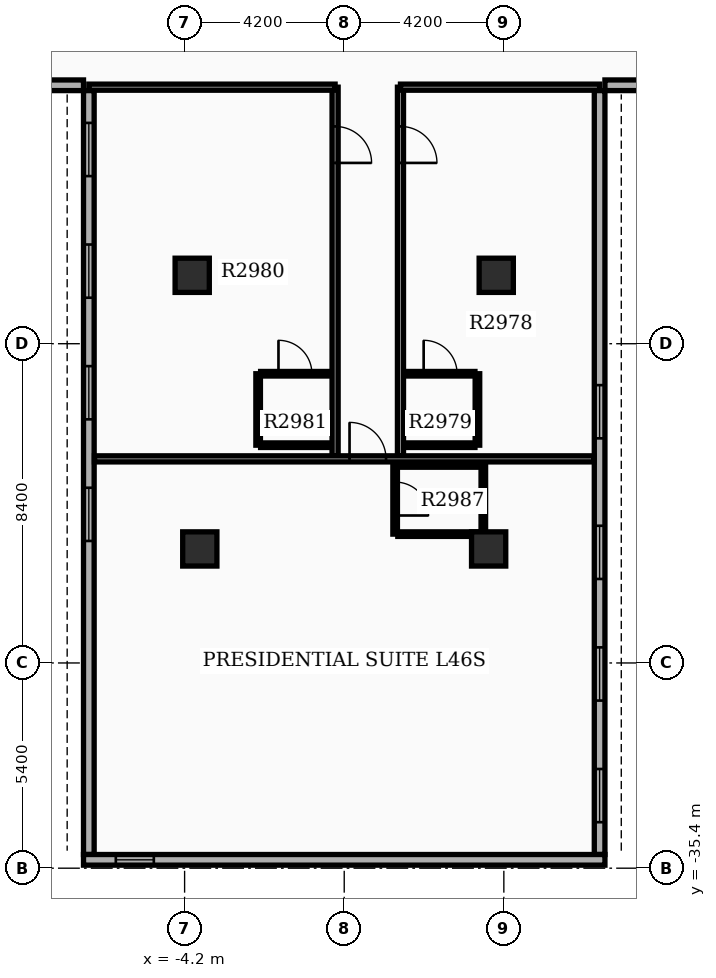
"""IFC4 building model, lengths in metres.
Left out: names, types, materials, properties, quantities, classifications, styles, units other than length and angle.
Written with IfcOpenShell. Run it as: python <this file> out.ifc"""

import sys

from ifc_helpers import new_model, si_unit, direction, frame, frame_2d, origin, origin_2d, place, context, subcontext, project, spatial, rectangle, extrude, element, fill, save


model = new_model("IFC4")
c1 = context("Model", 3, precision=1e-05, world=origin(), true_north=direction((0.0, 1.0)))
c2 = subcontext(c1, "Body", "Model", "MODEL_VIEW")
j1 = project(units=[si_unit("LENGTHUNIT", "METRE"), si_unit("PLANEANGLEUNIT", "RADIAN")], contexts=[c1])
p1 = place(None, origin())
s1 = spatial("IfcSite", under=j1, at=p1, CompositionType="ELEMENT")
p2 = place(p1, origin())
s2 = spatial("IfcBuilding", under=s1, at=p2, CompositionType="ELEMENT")
p3 = place(p2, frame((0.0, 0.0, 183.9)))
s3 = spatial("IfcBuildingStorey", under=s2, at=p3, CompositionType="ELEMENT", Elevation=183.9)
for number, where, z_axis, x_axis in (
    (1, (-4.0, -19.8, 0.0), (0.0, 0.0, 1.0), (1.0, 0.0, 0.0)),
    (2, (4.0, -19.8, 0.0), (0.0, 0.0, 1.0), (1.0, 0.0, 0.0)),
    (3, (-3.8, -27.0, 0.0), (0.0, 0.0, 1.0), (1.0, 0.0, 0.0)),
    (4, (3.8, -27.0, 0.0), (0.0, 0.0, 1.0), (1.0, 0.0, 0.0)),
):
    element("IfcColumn", number, at=place(p3, frame(where, z_axis=z_axis, x_axis=x_axis)), inside=s3, PredefinedType="COLUMN", context=c2, shape_type="SweptSolid", body=[
        extrude(rectangle(XDim=0.9, YDim=0.9, at=origin_2d()), origin(), (0.0, 0.0, 1.0), 3.9),
    ])
p4 = place(p3, frame((-6.72, -14.94, 0.0), z_axis=(0.0, 0.0, 1.0), x_axis=(0.0, -1.0, 0.0)))
e5 = element("IfcWall", 5, at=p4, inside=s3, PredefinedType="STANDARD", context=c2, shape_type="SweptSolid", body=[
    extrude(rectangle(XDim=20.1, YDim=0.28, at=frame_2d((10.05, 0.0))), origin(), (0.0, 0.0, 1.0), 2.97),
])
p5 = place(p4, frame((0.85, 0.0, 0.8)))
e6 = element("IfcOpeningElement", 6, at=p5, cuts=e5, PredefinedType="OPENING", context=c2, shape_type="SweptSolid", body=[
    extrude(rectangle(XDim=1.4, YDim=1.6, at=frame_2d((0.7, 0.8))), frame((0.0, 0.15, 0.0), z_axis=(0.0, -1.0, 0.0), x_axis=(1.0, 0.0, 0.0)), (0.0, 0.0, 1.0), 0.3),
])
p6 = place(p4, frame((4.05, 0.0, 0.8)))
e7 = element("IfcOpeningElement", 7, at=p6, cuts=e5, PredefinedType="OPENING", context=c2, shape_type="SweptSolid", body=[
    extrude(rectangle(XDim=1.4, YDim=1.6, at=frame_2d((0.7, 0.8))), frame((0.0, 0.15, 0.0), z_axis=(0.0, -1.0, 0.0), x_axis=(1.0, 0.0, 0.0)), (0.0, 0.0, 1.0), 0.3),
])
p7 = place(p4, frame((7.25, 0.0, 0.8)))
e8 = element("IfcOpeningElement", 8, at=p7, cuts=e5, PredefinedType="OPENING", context=c2, shape_type="SweptSolid", body=[
    extrude(rectangle(XDim=1.4, YDim=1.6, at=frame_2d((0.7, 0.8))), frame((0.0, 0.15, 0.0), z_axis=(0.0, -1.0, 0.0), x_axis=(1.0, 0.0, 0.0)), (0.0, 0.0, 1.0), 0.3),
])
p8 = place(p4, frame((10.45, 0.0, 0.8)))
e9 = element("IfcOpeningElement", 9, at=p8, cuts=e5, PredefinedType="OPENING", context=c2, shape_type="SweptSolid", body=[
    extrude(rectangle(XDim=1.4, YDim=1.6, at=frame_2d((0.7, 0.8))), frame((0.0, 0.15, 0.0), z_axis=(0.0, -1.0, 0.0), x_axis=(1.0, 0.0, 0.0)), (0.0, 0.0, 1.0), 0.3),
])
p9 = place(p3, frame((6.72, -35.04, 0.0), z_axis=(0.0, 0.0, 1.0), x_axis=(0.0, 1.0, 0.0)))
e10 = element("IfcWall", 10, at=p9, inside=s3, PredefinedType="STANDARD", context=c2, shape_type="SweptSolid", body=[
    extrude(rectangle(XDim=20.1, YDim=0.28, at=frame_2d((10.05, 0.0))), origin(), (0.0, 0.0, 1.0), 2.97),
])
p10 = place(p9, frame((0.85, 0.0, 0.8)))
e11 = element("IfcOpeningElement", 11, at=p10, cuts=e10, PredefinedType="OPENING", context=c2, shape_type="SweptSolid", body=[
    extrude(rectangle(XDim=1.4, YDim=1.6, at=frame_2d((0.7, 0.8))), frame((0.0, 0.15, 0.0), z_axis=(0.0, -1.0, 0.0), x_axis=(1.0, 0.0, 0.0)), (0.0, 0.0, 1.0), 0.3),
])
p11 = place(p9, frame((4.05, 0.0, 0.8)))
e12 = element("IfcOpeningElement", 12, at=p11, cuts=e10, PredefinedType="OPENING", context=c2, shape_type="SweptSolid", body=[
    extrude(rectangle(XDim=1.4, YDim=1.6, at=frame_2d((0.7, 0.8))), frame((0.0, 0.15, 0.0), z_axis=(0.0, -1.0, 0.0), x_axis=(1.0, 0.0, 0.0)), (0.0, 0.0, 1.0), 0.3),
])
p12 = place(p9, frame((7.25, 0.0, 0.8)))
e13 = element("IfcOpeningElement", 13, at=p12, cuts=e10, PredefinedType="OPENING", context=c2, shape_type="SweptSolid", body=[
    extrude(rectangle(XDim=1.4, YDim=1.6, at=frame_2d((0.7, 0.8))), frame((0.0, 0.15, 0.0), z_axis=(0.0, -1.0, 0.0), x_axis=(1.0, 0.0, 0.0)), (0.0, 0.0, 1.0), 0.3),
])
p13 = place(p9, frame((10.95, 0.0, 0.8)))
e14 = element("IfcOpeningElement", 14, at=p13, cuts=e10, PredefinedType="OPENING", context=c2, shape_type="SweptSolid", body=[
    extrude(rectangle(XDim=1.4, YDim=1.6, at=frame_2d((0.7, 0.8))), frame((0.0, 0.15, 0.0), z_axis=(0.0, -1.0, 0.0), x_axis=(1.0, 0.0, 0.0)), (0.0, 0.0, 1.0), 0.3),
])
p14 = place(p3, frame((-6.86, -35.18, 0.0), z_axis=(0.0, 0.0, 1.0), x_axis=(1.0, 0.0, 0.0)))
e15 = element("IfcWall", 15, at=p14, inside=s3, PredefinedType="STANDARD", context=c2, shape_type="SweptSolid", body=[
    extrude(rectangle(XDim=13.72, YDim=0.28, at=frame_2d((6.86, 0.0))), origin(), (0.0, 0.0, 1.0), 2.97),
])
p15 = place(p14, frame((0.85, 0.0, 0.85)))
e16 = element("IfcOpeningElement", 16, at=p15, cuts=e15, PredefinedType="OPENING", context=c2, shape_type="SweptSolid", body=[
    extrude(rectangle(XDim=1.0, YDim=1.5, at=frame_2d((0.5, 0.75))), frame((0.0, 0.15, 0.0), z_axis=(0.0, -1.0, 0.0), x_axis=(1.0, 0.0, 0.0)), (0.0, 0.0, 1.0), 0.3),
])
for number, where, z_axis, x_axis in (
    (17, (-13.16, -14.8, 0.0), (0.0, 0.0, 1.0), (1.0, 0.0, 0.0)),
    (18, (13.16, -14.8, 0.0), (0.0, 0.0, 1.0), (-1.0, 0.0, 0.0)),
):
    element("IfcWall", number, at=place(p3, frame(where, z_axis=z_axis, x_axis=x_axis)), inside=s3, PredefinedType="STANDARD", context=c2, shape_type="SweptSolid", body=[
        extrude(rectangle(XDim=6.3, YDim=0.28, at=frame_2d((3.15, 0.0))), origin(), (0.0, 0.0, 1.0), 2.97),
    ])
p16 = place(p3, frame((1.48, -14.85, 0.0), z_axis=(0.0, 0.0, 1.0), x_axis=(0.0, -1.0, 0.0)))
e19 = element("IfcWall", 19, at=p16, inside=s3, PredefinedType="PARTITIONING", context=c2, shape_type="SweptSolid", body=[
    extrude(rectangle(XDim=9.7, YDim=0.16, at=frame_2d((4.85, 0.0))), origin(), (0.0, 0.0, 1.0), 2.96),
])
p17 = place(p16, frame((1.033, 0.0, 0.0)))
e20 = element("IfcOpeningElement", 20, at=p17, cuts=e19, PredefinedType="OPENING", context=c2, shape_type="SweptSolid", body=[
    extrude(rectangle(XDim=0.96, YDim=2.15, at=frame_2d((0.48, 1.075))), frame((0.0, 0.09, 0.0), z_axis=(0.0, -1.0, 0.0), x_axis=(1.0, 0.0, 0.0)), (0.0, 0.0, 1.0), 0.18),
])
p18 = place(p3, frame((1.48, -14.85, 0.0), z_axis=(0.0, 0.0, 1.0), x_axis=(1.0, 0.0, 0.0)))
e21 = element("IfcWall", 21, at=p18, inside=s3, PredefinedType="PARTITIONING", context=c2, shape_type="SweptSolid", body=[
    extrude(rectangle(XDim=5.24, YDim=0.16, at=frame_2d((2.62, 0.0))), origin(), (0.0, 0.0, 1.0), 2.96),
])
p19 = place(p3, frame((1.62, -22.39, 0.0), z_axis=(0.0, 0.0, 1.0), x_axis=(1.0, 0.0, 0.0)))
e22 = element("IfcWall", 22, at=p19, inside=s3, PredefinedType="PARTITIONING", context=c2, shape_type="SweptSolid", body=[
    extrude(rectangle(XDim=1.82, YDim=0.12, at=frame_2d((0.91, 0.0))), origin(), (0.0, 0.0, 1.0), 2.96),
])
p20 = place(p19, frame((0.47, 0.0, 0.0)))
e23 = element("IfcOpeningElement", 23, at=p20, cuts=e22, PredefinedType="OPENING", context=c2, shape_type="SweptSolid", body=[
    extrude(rectangle(XDim=0.88, YDim=2.1, at=frame_2d((0.44, 1.05))), frame((0.0, 0.07, 0.0), z_axis=(0.0, -1.0, 0.0), x_axis=(1.0, 0.0, 0.0)), (0.0, 0.0, 1.0), 0.14),
])
p21 = place(p3, frame((1.62, -24.27, 0.0), z_axis=(0.0, 0.0, 1.0), x_axis=(1.0, 0.0, 0.0)))
e24 = element("IfcWall", 24, at=p21, inside=s3, PredefinedType="PARTITIONING", context=c2, shape_type="SweptSolid", body=[
    extrude(rectangle(XDim=1.82, YDim=0.12, at=frame_2d((0.91, 0.0))), origin(), (0.0, 0.0, 1.0), 2.96),
])
p22 = place(p3, frame((3.505, -22.39, 0.0), z_axis=(0.0, 0.0, 1.0), x_axis=(0.0, -1.0, 0.0)))
e25 = element("IfcWall", 25, at=p22, inside=s3, PredefinedType="PARTITIONING", context=c2, shape_type="SweptSolid", body=[
    extrude(rectangle(XDim=1.88, YDim=0.12, at=frame_2d((0.94, 0.0))), origin(), (0.0, 0.0, 1.0), 2.96),
])
p23 = place(p3, frame((-0.24, -14.85, 0.0), z_axis=(0.0, 0.0, 1.0), x_axis=(0.0, -1.0, 0.0)))
e26 = element("IfcWall", 26, at=p23, inside=s3, PredefinedType="PARTITIONING", context=c2, shape_type="SweptSolid", body=[
    extrude(rectangle(XDim=9.7, YDim=0.16, at=frame_2d((4.85, 0.0))), origin(), (0.0, 0.0, 1.0), 2.96),
])
p24 = place(p23, frame((1.033, 0.0, 0.0)))
e27 = element("IfcOpeningElement", 27, at=p24, cuts=e26, PredefinedType="OPENING", context=c2, shape_type="SweptSolid", body=[
    extrude(rectangle(XDim=0.96, YDim=2.15, at=frame_2d((0.48, 1.075))), frame((0.0, 0.09, 0.0), z_axis=(0.0, -1.0, 0.0), x_axis=(1.0, 0.0, 0.0)), (0.0, 0.0, 1.0), 0.18),
])
p25 = place(p3, frame((-0.24, -14.85, 0.0), z_axis=(0.0, 0.0, 1.0), x_axis=(-1.0, 0.0, 0.0)))
e28 = element("IfcWall", 28, at=p25, inside=s3, PredefinedType="PARTITIONING", context=c2, shape_type="SweptSolid", body=[
    extrude(rectangle(XDim=6.48, YDim=0.16, at=frame_2d((3.24, 0.0))), origin(), (0.0, 0.0, 1.0), 2.96),
])
p26 = place(p3, frame((-2.2, -22.39, 0.0), z_axis=(0.0, 0.0, 1.0), x_axis=(1.0, 0.0, 0.0)))
e29 = element("IfcWall", 29, at=p26, inside=s3, PredefinedType="PARTITIONING", context=c2, shape_type="SweptSolid", body=[
    extrude(rectangle(XDim=1.82, YDim=0.12, at=frame_2d((0.91, 0.0))), origin(), (0.0, 0.0, 1.0), 2.96),
])
p27 = place(p26, frame((0.47, 0.0, 0.0)))
e30 = element("IfcOpeningElement", 30, at=p27, cuts=e29, PredefinedType="OPENING", context=c2, shape_type="SweptSolid", body=[
    extrude(rectangle(XDim=0.88, YDim=2.1, at=frame_2d((0.44, 1.05))), frame((0.0, 0.07, 0.0), z_axis=(0.0, -1.0, 0.0), x_axis=(1.0, 0.0, 0.0)), (0.0, 0.0, 1.0), 0.14),
])
p28 = place(p3, frame((-2.2, -24.27, 0.0), z_axis=(0.0, 0.0, 1.0), x_axis=(1.0, 0.0, 0.0)))
e31 = element("IfcWall", 31, at=p28, inside=s3, PredefinedType="PARTITIONING", context=c2, shape_type="SweptSolid", body=[
    extrude(rectangle(XDim=1.82, YDim=0.12, at=frame_2d((0.91, 0.0))), origin(), (0.0, 0.0, 1.0), 2.96),
])
p29 = place(p3, frame((-2.265, -22.39, 0.0), z_axis=(0.0, 0.0, 1.0), x_axis=(0.0, -1.0, 0.0)))
e32 = element("IfcWall", 32, at=p29, inside=s3, PredefinedType="PARTITIONING", context=c2, shape_type="SweptSolid", body=[
    extrude(rectangle(XDim=1.88, YDim=0.12, at=frame_2d((0.94, 0.0))), origin(), (0.0, 0.0, 1.0), 2.96),
])
p30 = place(p3, frame((-6.572, -24.63, 0.0), z_axis=(0.0, 0.0, 1.0), x_axis=(1.0, 0.0, 0.0)))
e33 = element("IfcWall", 33, at=p30, inside=s3, PredefinedType="PARTITIONING", context=c2, shape_type="SweptSolid", body=[
    extrude(rectangle(XDim=13.144, YDim=0.16, at=frame_2d((6.572, 0.0))), origin(), (0.0, 0.0, 1.0), 2.96),
])
p31 = place(p30, frame((6.712, 0.0, 0.0)))
e34 = element("IfcOpeningElement", 34, at=p31, cuts=e33, PredefinedType="OPENING", context=c2, shape_type="SweptSolid", body=[
    extrude(rectangle(XDim=0.96, YDim=2.15, at=frame_2d((0.48, 1.075))), frame((0.0, 0.09, 0.0), z_axis=(0.0, -1.0, 0.0), x_axis=(1.0, 0.0, 0.0)), (0.0, 0.0, 1.0), 0.18),
])
p32 = place(p3, frame((1.34, -24.79, 0.0), z_axis=(0.0, 0.0, 1.0), x_axis=(0.0, -1.0, 0.0)))
e35 = element("IfcWall", 35, at=p32, inside=s3, PredefinedType="PARTITIONING", context=c2, shape_type="SweptSolid", body=[
    extrude(rectangle(XDim=1.82, YDim=0.12, at=frame_2d((0.91, 0.0))), origin(), (0.0, 0.0, 1.0), 2.96),
])
p33 = place(p32, frame((0.45, 0.0, 0.0)))
e36 = element("IfcOpeningElement", 36, at=p33, cuts=e35, PredefinedType="OPENING", context=c2, shape_type="SweptSolid", body=[
    extrude(rectangle(XDim=0.88, YDim=2.1, at=frame_2d((0.44, 1.05))), frame((0.0, 0.07, 0.0), z_axis=(0.0, -1.0, 0.0), x_axis=(1.0, 0.0, 0.0)), (0.0, 0.0, 1.0), 0.14),
])
p34 = place(p3, frame((3.66, -24.79, 0.0), z_axis=(0.0, 0.0, 1.0), x_axis=(0.0, -1.0, 0.0)))
e37 = element("IfcWall", 37, at=p34, inside=s3, PredefinedType="PARTITIONING", context=c2, shape_type="SweptSolid", body=[
    extrude(rectangle(XDim=1.82, YDim=0.12, at=frame_2d((0.91, 0.0))), origin(), (0.0, 0.0, 1.0), 2.96),
])
for number, where, z_axis, x_axis in (
    (38, (1.41, -24.79, 0.0), (0.0, 0.0, 1.0), (1.0, 0.0, 0.0)),
    (39, (1.41, -26.61, 0.0), (0.0, 0.0, 1.0), (1.0, 0.0, 0.0)),
):
    element("IfcWall", number, at=place(p3, frame(where, z_axis=z_axis, x_axis=x_axis)), inside=s3, PredefinedType="PARTITIONING", context=c2, shape_type="SweptSolid", body=[
        extrude(rectangle(XDim=2.18, YDim=0.12, at=frame_2d((1.09, 0.0))), origin(), (0.0, 0.0, 1.0), 2.96),
    ])
p35 = place(p5, origin())
e40 = element("IfcWindow", 40, at=p35, inside=s3, PartitioningType="SINGLE_PANEL", PredefinedType="WINDOW", context=c2, shape_type="SweptSolid", body=[
    extrude(rectangle(XDim=1.4, YDim=1.6, at=frame_2d((0.7, 0.8))), frame((0.0, 0.03, 0.0), z_axis=(0.0, -1.0, 0.0), x_axis=(1.0, 0.0, 0.0)), (0.0, 0.0, 1.0), 0.06),
])
fill(e6, e40)
p36 = place(p6, origin())
e41 = element("IfcWindow", 41, at=p36, inside=s3, PartitioningType="SINGLE_PANEL", PredefinedType="WINDOW", context=c2, shape_type="SweptSolid", body=[
    extrude(rectangle(XDim=1.4, YDim=1.6, at=frame_2d((0.7, 0.8))), frame((0.0, 0.03, 0.0), z_axis=(0.0, -1.0, 0.0), x_axis=(1.0, 0.0, 0.0)), (0.0, 0.0, 1.0), 0.06),
])
fill(e7, e41)
p37 = place(p7, origin())
e42 = element("IfcWindow", 42, at=p37, inside=s3, PartitioningType="SINGLE_PANEL", PredefinedType="WINDOW", context=c2, shape_type="SweptSolid", body=[
    extrude(rectangle(XDim=1.4, YDim=1.6, at=frame_2d((0.7, 0.8))), frame((0.0, 0.03, 0.0), z_axis=(0.0, -1.0, 0.0), x_axis=(1.0, 0.0, 0.0)), (0.0, 0.0, 1.0), 0.06),
])
fill(e8, e42)
p38 = place(p8, origin())
e43 = element("IfcWindow", 43, at=p38, inside=s3, PartitioningType="SINGLE_PANEL", PredefinedType="WINDOW", context=c2, shape_type="SweptSolid", body=[
    extrude(rectangle(XDim=1.4, YDim=1.6, at=frame_2d((0.7, 0.8))), frame((0.0, 0.03, 0.0), z_axis=(0.0, -1.0, 0.0), x_axis=(1.0, 0.0, 0.0)), (0.0, 0.0, 1.0), 0.06),
])
fill(e9, e43)
p39 = place(p10, origin())
e44 = element("IfcWindow", 44, at=p39, inside=s3, PartitioningType="SINGLE_PANEL", PredefinedType="WINDOW", context=c2, shape_type="SweptSolid", body=[
    extrude(rectangle(XDim=1.4, YDim=1.6, at=frame_2d((0.7, 0.8))), frame((0.0, 0.03, 0.0), z_axis=(0.0, -1.0, 0.0), x_axis=(1.0, 0.0, 0.0)), (0.0, 0.0, 1.0), 0.06),
])
fill(e11, e44)
p40 = place(p11, origin())
e45 = element("IfcWindow", 45, at=p40, inside=s3, PartitioningType="SINGLE_PANEL", PredefinedType="WINDOW", context=c2, shape_type="SweptSolid", body=[
    extrude(rectangle(XDim=1.4, YDim=1.6, at=frame_2d((0.7, 0.8))), frame((0.0, 0.03, 0.0), z_axis=(0.0, -1.0, 0.0), x_axis=(1.0, 0.0, 0.0)), (0.0, 0.0, 1.0), 0.06),
])
fill(e12, e45)
p41 = place(p12, origin())
e46 = element("IfcWindow", 46, at=p41, inside=s3, PartitioningType="SINGLE_PANEL", PredefinedType="WINDOW", context=c2, shape_type="SweptSolid", body=[
    extrude(rectangle(XDim=1.4, YDim=1.6, at=frame_2d((0.7, 0.8))), frame((0.0, 0.03, 0.0), z_axis=(0.0, -1.0, 0.0), x_axis=(1.0, 0.0, 0.0)), (0.0, 0.0, 1.0), 0.06),
])
fill(e13, e46)
p42 = place(p13, origin())
e47 = element("IfcWindow", 47, at=p42, inside=s3, PartitioningType="SINGLE_PANEL", PredefinedType="WINDOW", context=c2, shape_type="SweptSolid", body=[
    extrude(rectangle(XDim=1.4, YDim=1.6, at=frame_2d((0.7, 0.8))), frame((0.0, 0.03, 0.0), z_axis=(0.0, -1.0, 0.0), x_axis=(1.0, 0.0, 0.0)), (0.0, 0.0, 1.0), 0.06),
])
fill(e14, e47)
p43 = place(p15, origin())
e48 = element("IfcWindow", 48, at=p43, inside=s3, PartitioningType="SINGLE_PANEL", PredefinedType="WINDOW", context=c2, shape_type="SweptSolid", body=[
    extrude(rectangle(XDim=1.0, YDim=1.5, at=frame_2d((0.5, 0.75))), frame((0.0, 0.03, 0.0), z_axis=(0.0, -1.0, 0.0), x_axis=(1.0, 0.0, 0.0)), (0.0, 0.0, 1.0), 0.06),
])
fill(e16, e48)
p44 = place(p17, origin())
e49 = element("IfcDoor", 49, at=p44, inside=s3, OperationType="SINGLE_SWING_RIGHT", PredefinedType="DOOR", context=c2, shape_type="SweptSolid", body=[
    extrude(rectangle(XDim=0.96, YDim=2.15, at=frame_2d((0.48, 1.075))), frame((0.0, 0.025, 0.0), z_axis=(0.0, -1.0, 0.0), x_axis=(1.0, 0.0, 0.0)), (0.0, 0.0, 1.0), 0.05),
])
fill(e20, e49)
p45 = place(p20, origin())
e50 = element("IfcDoor", 50, at=p45, inside=s3, OperationType="SINGLE_SWING_LEFT", PredefinedType="DOOR", context=c2, shape_type="SweptSolid", body=[
    extrude(rectangle(XDim=0.88, YDim=2.1, at=frame_2d((0.44, 1.05))), frame((0.0, 0.025, 0.0), z_axis=(0.0, -1.0, 0.0), x_axis=(1.0, 0.0, 0.0)), (0.0, 0.0, 1.0), 0.05),
])
fill(e23, e50)
p46 = place(p24, origin())
e51 = element("IfcDoor", 51, at=p46, inside=s3, OperationType="SINGLE_SWING_RIGHT", PredefinedType="DOOR", context=c2, shape_type="SweptSolid", body=[
    extrude(rectangle(XDim=0.96, YDim=2.15, at=frame_2d((0.48, 1.075))), frame((0.0, 0.025, 0.0), z_axis=(0.0, -1.0, 0.0), x_axis=(1.0, 0.0, 0.0)), (0.0, 0.0, 1.0), 0.05),
])
fill(e27, e51)
p47 = place(p27, origin())
e52 = element("IfcDoor", 52, at=p47, inside=s3, OperationType="SINGLE_SWING_LEFT", PredefinedType="DOOR", context=c2, shape_type="SweptSolid", body=[
    extrude(rectangle(XDim=0.88, YDim=2.1, at=frame_2d((0.44, 1.05))), frame((0.0, 0.025, 0.0), z_axis=(0.0, -1.0, 0.0), x_axis=(1.0, 0.0, 0.0)), (0.0, 0.0, 1.0), 0.05),
])
fill(e30, e52)
p48 = place(p31, origin())
e53 = element("IfcDoor", 53, at=p48, inside=s3, OperationType="SINGLE_SWING_LEFT", PredefinedType="DOOR", context=c2, shape_type="SweptSolid", body=[
    extrude(rectangle(XDim=0.96, YDim=2.15, at=frame_2d((0.48, 1.075))), frame((0.0, 0.025, 0.0), z_axis=(0.0, -1.0, 0.0), x_axis=(1.0, 0.0, 0.0)), (0.0, 0.0, 1.0), 0.05),
])
fill(e34, e53)
p49 = place(p33, origin())
e54 = element("IfcDoor", 54, at=p49, inside=s3, OperationType="SINGLE_SWING_RIGHT", PredefinedType="DOOR", context=c2, shape_type="SweptSolid", body=[
    extrude(rectangle(XDim=0.88, YDim=2.1, at=frame_2d((0.44, 1.05))), frame((0.0, 0.025, 0.0), z_axis=(0.0, -1.0, 0.0), x_axis=(1.0, 0.0, 0.0)), (0.0, 0.0, 1.0), 0.05),
])
fill(e36, e54)
save(model, sys.argv[1])
